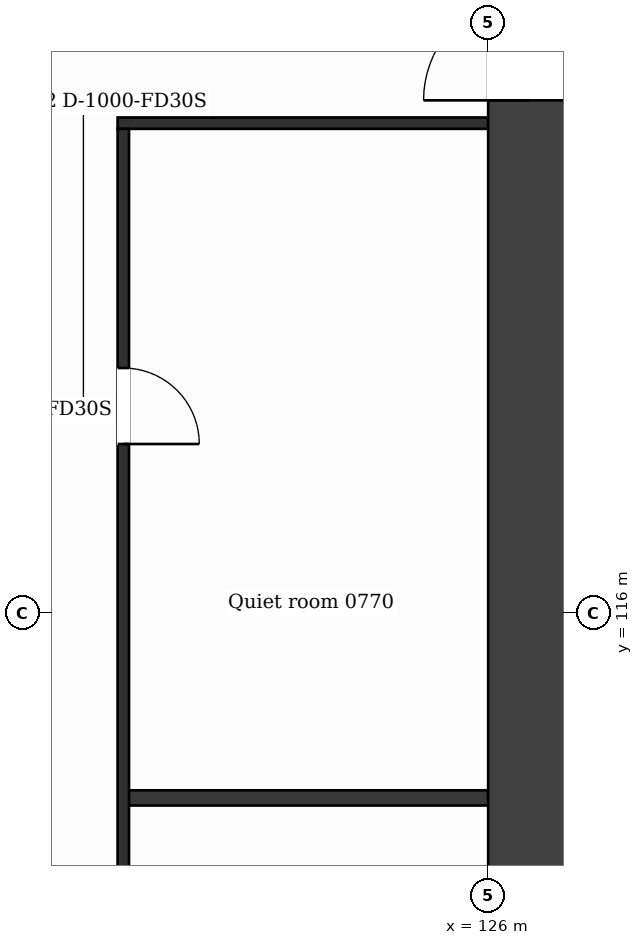
"""IFC4 building model, lengths in metres.
Left out: names, types, materials, properties, quantities, classifications, styles, units other than length and angle.
Written with IfcOpenShell. Run it as: python <this file> out.ifc"""

import sys

from ifc_helpers import new_model, si_unit, direction, frame, frame_2d, origin, place, context, subcontext, project, spatial, rectangle, extrude, element, fill, save


model = new_model("IFC4")
c1 = context("Model", 3, precision=1e-05, world=origin(), true_north=direction((0.0, 1.0)))
c2 = subcontext(c1, "Body", "Model", "MODEL_VIEW")
j1 = project(units=[si_unit("LENGTHUNIT", "METRE"), si_unit("PLANEANGLEUNIT", "RADIAN")], contexts=[c1])
p1 = place(None, origin())
s1 = spatial("IfcSite", under=j1, at=p1, CompositionType="ELEMENT")
p2 = place(p1, origin())
s2 = spatial("IfcBuilding", under=s1, at=p2, CompositionType="ELEMENT")
p3 = place(p2, frame((0.0, 0.0, 42.5)))
s3 = spatial("IfcBuildingStorey", under=s2, at=p3, CompositionType="ELEMENT", Elevation=42.5)
p4 = place(p3, frame((126.55, 110.95, 0.0), z_axis=(0.0, 0.0, 1.0), x_axis=(0.0, 1.0, 0.0)))
e1 = element("IfcWall", 1, at=p4, inside=s3, PredefinedType="SHEAR", context=c2, shape_type="SweptSolid", body=[
    extrude(rectangle(XDim=20.9, YDim=1.1, at=frame_2d((10.45, 0.0))), origin(), (0.0, 0.0, 1.0), 3.5),
])
p5 = place(p4, frame((11.8, 0.0, 0.0)))
e2 = element("IfcOpeningElement", 2, at=p5, cuts=e1, PredefinedType="OPENING", context=c2, shape_type="SweptSolid", body=[
    extrude(rectangle(XDim=1.4, YDim=2.1, at=frame_2d((0.7, 1.05))), frame((0.0, 0.56, 0.0), z_axis=(0.0, -1.0, 0.0), x_axis=(1.0, 0.0, 0.0)), (0.0, 0.0, 1.0), 1.12),
])
p6 = place(p3, frame((121.2, 113.573, 0.0), z_axis=(0.0, 0.0, 1.0), x_axis=(1.0, 0.0, 0.0)))
e3 = element("IfcWall", 3, at=p6, inside=s3, PredefinedType="PARTITIONING", context=c2, shape_type="SweptSolid", body=[
    extrude(rectangle(XDim=4.8, YDim=0.2, at=frame_2d((2.4, 0.0))), origin(), (0.0, 0.0, 1.0), 3.18),
])
p7 = place(p3, frame((121.125, 122.45, 0.0), z_axis=(0.0, 0.0, 1.0), x_axis=(1.0, 0.0, 0.0)))
e4 = element("IfcWall", 4, at=p7, inside=s3, PredefinedType="PARTITIONING", context=c2, shape_type="SweptSolid", body=[
    extrude(rectangle(XDim=4.875, YDim=0.15, at=frame_2d((2.438, 0.0))), origin(), (0.0, 0.0, 1.0), 3.18),
])
p8 = place(p3, frame((121.2, 109.075, 0.0), z_axis=(0.0, 0.0, 1.0), x_axis=(0.0, 1.0, 0.0)))
e5 = element("IfcWall", 5, at=p8, inside=s3, PredefinedType="PARTITIONING", context=c2, shape_type="SweptSolid", body=[
    extrude(rectangle(XDim=13.3, YDim=0.15, at=frame_2d((6.65, 0.0))), origin(), (0.0, 0.0, 1.0), 3.18),
])
p9 = place(p8, frame((9.154, 0.0, 0.0)))
e6 = element("IfcOpeningElement", 6, at=p9, cuts=e5, PredefinedType="OPENING", context=c2, shape_type="SweptSolid", body=[
    extrude(rectangle(XDim=1.0, YDim=2.1, at=frame_2d((0.5, 1.05))), frame((0.0, 0.085, 0.0), z_axis=(0.0, -1.0, 0.0), x_axis=(1.0, 0.0, 0.0)), (0.0, 0.0, 1.0), 0.17),
])
p10 = place(p9, origin())
e7 = element("IfcDoor", 7, at=p10, inside=s3, OperationType="SINGLE_SWING_LEFT", PredefinedType="DOOR", context=c2, shape_type="SweptSolid", body=[
    extrude(rectangle(XDim=1.0, YDim=2.1, at=frame_2d((0.5, 1.05))), frame((0.0, 0.025, 0.0), z_axis=(0.0, -1.0, 0.0), x_axis=(1.0, 0.0, 0.0)), (0.0, 0.0, 1.0), 0.05),
])
fill(e6, e7)
p11 = place(p5, origin())
e8 = element("IfcDoor", 8, at=p11, inside=s3, OperationType="SINGLE_SWING_LEFT", PredefinedType="DOOR", context=c2, shape_type="SweptSolid", body=[
    extrude(rectangle(XDim=1.4, YDim=2.1, at=frame_2d((0.7, 1.05))), frame((0.0, 0.025, 0.0), z_axis=(0.0, -1.0, 0.0), x_axis=(1.0, 0.0, 0.0)), (0.0, 0.0, 1.0), 0.05),
])
fill(e2, e8)
save(model, sys.argv[1])
